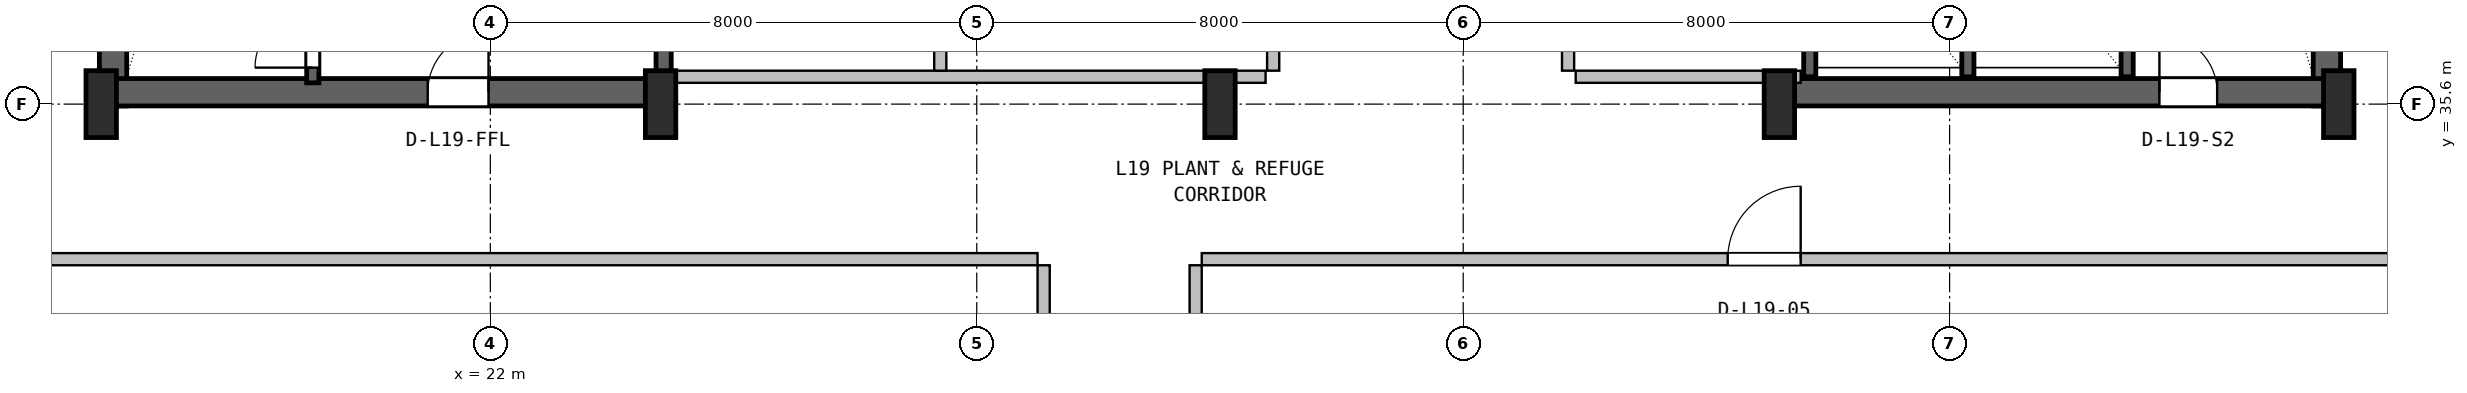
"""IFC4 building model, lengths in metres.
Left out: names, types, materials, properties, quantities, classifications, styles, units other than length and angle.
Written with IfcOpenShell. Run it as: python <this file> out.ifc"""

import sys

from ifc_helpers import new_model, si_unit, direction, frame, frame_2d, origin, origin_2d, place, context, subcontext, project, spatial, rectangle, i_section, extrude, source, transform, mapped, element, fill, save


model = new_model("IFC4")
c1 = context("Model", 3, precision=1e-05, world=origin(), true_north=direction((0.0, 1.0)))
c2 = subcontext(c1, "Body", "Model", "MODEL_VIEW")
j1 = project(units=[si_unit("LENGTHUNIT", "METRE"), si_unit("PLANEANGLEUNIT", "RADIAN")], contexts=[c1])
p1 = place(None, origin())
s1 = spatial("IfcSite", under=j1, at=p1, CompositionType="ELEMENT")
p2 = place(p1, origin())
s2 = spatial("IfcBuilding", under=s1, at=p2, CompositionType="ELEMENT")
p3 = place(p2, frame((0.0, 0.0, 82.2)))
s3 = spatial("IfcBuildingStorey", under=s2, at=p3, CompositionType="ELEMENT", Elevation=82.2)
for number, where, z_axis, x_axis in (
    (1, (15.795, 35.57, 0.0), (0.0, 0.0, 1.0), (0.0, 1.0, 0.0)),
    (2, (52.205, 35.57, 0.0), (0.0, 0.0, 1.0), (0.0, 1.0, 0.0)),
):
    element("IfcWall", number, at=place(p3, frame(where, z_axis=z_axis, x_axis=x_axis)), inside=s3, PredefinedType="SHEAR", context=c2, shape_type="SweptSolid", body=[
        extrude(rectangle(XDim=11.23, YDim=0.45, at=frame_2d((5.615, 0.0))), origin(), (0.0, 0.0, 1.0), 4.55),
    ])
p4 = place(p3, frame((15.57, 35.795, 0.0), z_axis=(0.0, 0.0, 1.0), x_axis=(1.0, 0.0, 0.0)))
e3 = element("IfcWall", 3, at=p4, inside=s3, PredefinedType="SHEAR", context=c2, shape_type="SweptSolid", body=[
    extrude(rectangle(XDim=9.23, YDim=0.45, at=frame_2d((4.615, 0.0))), origin(), (0.0, 0.0, 1.0), 4.55),
])
p5 = place(p4, frame((5.4, 0.0, 0.0)))
e4 = element("IfcOpeningElement", 4, at=p5, cuts=e3, PredefinedType="OPENING", context=c2, shape_type="SweptSolid", body=[
    extrude(rectangle(XDim=1.0, YDim=2.1, at=frame_2d((0.5, 1.05))), frame((0.0, 0.235, 0.0), z_axis=(0.0, -1.0, 0.0), x_axis=(1.0, 0.0, 0.0)), (0.0, 0.0, 1.0), 0.47),
])
p6 = place(p3, frame((43.2, 35.795, 0.0), z_axis=(0.0, 0.0, 1.0), x_axis=(1.0, 0.0, 0.0)))
e5 = element("IfcWall", 5, at=p6, inside=s3, PredefinedType="SHEAR", context=c2, shape_type="SweptSolid", body=[
    extrude(rectangle(XDim=9.23, YDim=0.45, at=frame_2d((4.615, 0.0))), origin(), (0.0, 0.0, 1.0), 4.55),
])
p7 = place(p6, frame((6.25, 0.0, 0.0)))
e6 = element("IfcOpeningElement", 6, at=p7, cuts=e5, PredefinedType="OPENING", context=c2, shape_type="SweptSolid", body=[
    extrude(rectangle(XDim=0.95, YDim=2.1, at=frame_2d((0.475, 1.05))), frame((0.0, 0.235, 0.0), z_axis=(0.0, -1.0, 0.0), x_axis=(1.0, 0.0, 0.0)), (0.0, 0.0, 1.0), 0.47),
])
m1 = source(origin(), c2, "Body", "SweptSolid", [
    extrude(i_section(OverallWidth=0.5, OverallDepth=1.1, WebThickness=0.018, FlangeThickness=0.032, FilletRadius=0.018, at=origin_2d()), origin(), (0.0, 0.0, 1.0), 4.8),
])
for number, where, z_axis, x_axis in (
    (7, (15.6, 35.6, 0.0), (0.0, 0.0, 1.0), (1.0, 0.0, 0.0)),
    (8, (24.8, 35.6, 0.0), (0.0, 0.0, 1.0), (1.0, 0.0, 0.0)),
    (9, (34.0, 35.6, 0.0), (0.0, 0.0, 1.0), (1.0, 0.0, 0.0)),
    (10, (43.2, 35.6, 0.0), (0.0, 0.0, 1.0), (1.0, 0.0, 0.0)),
    (11, (52.4, 35.6, 0.0), (0.0, 0.0, 1.0), (1.0, 0.0, 0.0)),
):
    element("IfcColumn", number, at=place(p3, frame(where, z_axis=z_axis, x_axis=x_axis)), inside=s3, PredefinedType="COLUMN", context=c2, shape_type="MappedRepresentation", body=[
        mapped(m1, transform((0.0, 0.0, 0.0), x_axis=(1.0, 0.0, 0.0), y_axis=(0.0, 1.0, 0.0), z_axis=(0.0, 0.0, 1.0), scale=1.0)),
    ])
p8 = place(p3, frame((19.08, 35.95, 0.0), z_axis=(0.0, 0.0, 1.0), x_axis=(0.0, 1.0, 0.0)))
e12 = element("IfcWall", 12, at=p8, inside=s3, PredefinedType="SHEAR", context=c2, shape_type="SweptSolid", body=[
    extrude(rectangle(XDim=9.65, YDim=0.2, at=frame_2d((4.825, 0.0))), origin(), (0.0, 0.0, 1.0), 4.55),
])
p9 = place(p8, frame((0.25, 0.0, 0.0)))
e13 = element("IfcOpeningElement", 13, at=p9, cuts=e12, PredefinedType="OPENING", context=c2, shape_type="SweptSolid", body=[
    extrude(rectangle(XDim=0.95, YDim=2.1, at=frame_2d((0.475, 1.05))), frame((0.0, 0.11, 0.0), z_axis=(0.0, -1.0, 0.0), x_axis=(1.0, 0.0, 0.0)), (0.0, 0.0, 1.0), 0.22),
])
p10 = place(p3, frame((24.85, 36.05, 0.0), z_axis=(0.0, 0.0, 1.0), x_axis=(0.0, 1.0, 0.0)))
e14 = element("IfcWall", 14, at=p10, inside=s3, PredefinedType="SHEAR", context=c2, shape_type="SweptSolid", body=[
    extrude(rectangle(XDim=10.45, YDim=0.25, at=frame_2d((5.225, 0.0))), origin(), (0.0, 0.0, 1.0), 4.55),
])
p11 = place(p3, frame((48.92, 36.05, 0.0), z_axis=(0.0, 0.0, 1.0), x_axis=(0.0, 1.0, 0.0)))
e15 = element("IfcWall", 15, at=p11, inside=s3, PredefinedType="SHEAR", context=c2, shape_type="SweptSolid", body=[
    extrude(rectangle(XDim=10.5, YDim=0.2, at=frame_2d((5.25, 0.0))), origin(), (0.0, 0.0, 1.0), 4.55),
])
for number, where, z_axis, x_axis in (
    (16, (43.7, 36.05, 0.0), (0.0, 0.0, 1.0), (0.0, 1.0, 0.0)),
    (17, (46.3, 36.05, 0.0), (0.0, 0.0, 1.0), (0.0, 1.0, 0.0)),
):
    element("IfcWall", number, at=place(p3, frame(where, z_axis=z_axis, x_axis=x_axis)), inside=s3, PredefinedType="SHEAR", context=c2, shape_type="SweptSolid", body=[
        extrude(rectangle(XDim=3.05, YDim=0.2, at=frame_2d((1.525, 0.0))), origin(), (0.0, 0.0, 1.0), 4.55),
    ])
p12 = place(p3, frame((25.0, 36.05, 0.0), z_axis=(0.0, 0.0, 1.0), x_axis=(1.0, 0.0, 0.0)))
e18 = element("IfcWall", 18, at=p12, inside=s3, PredefinedType="SOLIDWALL", context=c2, shape_type="SweptSolid", body=[
    extrude(rectangle(XDim=9.75, YDim=0.2, at=frame_2d((4.875, 0.0))), origin(), (0.0, 0.0, 1.0), 4.53),
])
for number, where, z_axis, x_axis in (
    (19, (29.4, 36.15, 0.0), (0.0, 0.0, 1.0), (0.0, 1.0, 0.0)),
    (20, (34.875, 36.15, 0.0), (0.0, 0.0, 1.0), (0.0, 1.0, 0.0)),
):
    element("IfcWall", number, at=place(p3, frame(where, z_axis=z_axis, x_axis=x_axis)), inside=s3, PredefinedType="SOLIDWALL", context=c2, shape_type="SweptSolid", body=[
        extrude(rectangle(XDim=3.0, YDim=0.2, at=frame_2d((1.5, 0.0))), origin(), (0.0, 0.0, 1.0), 4.53),
    ])
p13 = place(p3, frame((39.85, 36.05, 0.0), z_axis=(0.0, 0.0, 1.0), x_axis=(1.0, 0.0, 0.0)))
e21 = element("IfcWall", 21, at=p13, inside=s3, PredefinedType="SOLIDWALL", context=c2, shape_type="SweptSolid", body=[
    extrude(rectangle(XDim=3.7, YDim=0.2, at=frame_2d((1.85, 0.0))), origin(), (0.0, 0.0, 1.0), 4.53),
])
p14 = place(p3, frame((39.725, 36.15, 0.0), z_axis=(0.0, 0.0, 1.0), x_axis=(0.0, 1.0, 0.0)))
e22 = element("IfcWall", 22, at=p14, inside=s3, PredefinedType="SOLIDWALL", context=c2, shape_type="SweptSolid", body=[
    extrude(rectangle(XDim=3.0, YDim=0.2, at=frame_2d((1.5, 0.0))), origin(), (0.0, 0.0, 1.0), 4.53),
])
p15 = place(p3, frame((31.1, 19.775, 0.0), z_axis=(0.0, 0.0, 1.0), x_axis=(0.0, 1.0, 0.0)))
e23 = element("IfcWall", 23, at=p15, inside=s3, PredefinedType="SOLIDWALL", context=c2, shape_type="SweptSolid", body=[
    extrude(rectangle(XDim=13.175, YDim=0.2, at=frame_2d((6.587, 0.0))), origin(), (0.0, 0.0, 1.0), 3.195),
])
p16 = place(p3, frame((2.18, 33.05, 0.0), z_axis=(0.0, 0.0, 1.0), x_axis=(1.0, 0.0, 0.0)))
e24 = element("IfcWall", 24, at=p16, inside=s3, PredefinedType="SOLIDWALL", context=c2, shape_type="SweptSolid", body=[
    extrude(rectangle(XDim=28.82, YDim=0.2, at=frame_2d((14.41, 0.0))), origin(), (0.0, 0.0, 1.0), 2.925),
])
p17 = place(p3, frame((33.7, 33.05, 0.0), z_axis=(0.0, 0.0, 1.0), x_axis=(1.0, 0.0, 0.0)))
e25 = element("IfcWall", 25, at=p17, inside=s3, PredefinedType="SOLIDWALL", context=c2, shape_type="SweptSolid", body=[
    extrude(rectangle(XDim=32.12, YDim=0.2, at=frame_2d((16.06, 0.0))), origin(), (0.0, 0.0, 1.0), 2.925),
])
p18 = place(p17, frame((8.65, 0.0, 0.0)))
e26 = element("IfcOpeningElement", 26, at=p18, cuts=e25, PredefinedType="OPENING", context=c2, shape_type="SweptSolid", body=[
    extrude(rectangle(XDim=1.2, YDim=2.1, at=frame_2d((0.6, 1.05))), frame((0.0, 0.11, 0.0), z_axis=(0.0, -1.0, 0.0), x_axis=(1.0, 0.0, 0.0)), (0.0, 0.0, 1.0), 0.22),
])
p19 = place(p3, frame((33.6, 1.38, 0.0), z_axis=(0.0, 0.0, 1.0), x_axis=(0.0, 1.0, 0.0)))
e27 = element("IfcWall", 27, at=p19, inside=s3, PredefinedType="SOLIDWALL", context=c2, shape_type="SweptSolid", body=[
    extrude(rectangle(XDim=31.57, YDim=0.2, at=frame_2d((15.785, 0.0))), origin(), (0.0, 0.0, 1.0), 2.925),
])
p20 = place(p19, frame((7.895, 0.0, 0.0)))
e28 = element("IfcOpeningElement", 28, at=p20, cuts=e27, PredefinedType="OPENING", context=c2, shape_type="SweptSolid", body=[
    extrude(rectangle(XDim=1.2, YDim=2.1, at=frame_2d((0.6, 1.05))), frame((0.0, 0.11, 0.0), z_axis=(0.0, -1.0, 0.0), x_axis=(1.0, 0.0, 0.0)), (0.0, 0.0, 1.0), 0.22),
])
m2 = source(origin(), c2, "Body", "SweptSolid", [
    extrude(rectangle(XDim=0.95, YDim=2.1, at=frame_2d((0.475, 1.05))), frame((0.0, 0.025, 0.0), z_axis=(0.0, -1.0, 0.0), x_axis=(1.0, 0.0, 0.0)), (0.0, 0.0, 1.0), 0.05),
])
p21 = place(p9, origin())
e29 = element("IfcDoor", 29, at=p21, inside=s3, OperationType="SINGLE_SWING_LEFT", PredefinedType="DOOR", context=c2, shape_type="MappedRepresentation", body=[
    mapped(m2, transform((0.0, 0.0, 0.0), x_axis=(1.0, 0.0, 0.0), y_axis=(0.0, 1.0, 0.0), z_axis=(0.0, 0.0, 1.0), scale=1.0)),
])
fill(e13, e29)
m3 = source(origin(), c2, "Body", "SweptSolid", [
    extrude(rectangle(XDim=1.0, YDim=2.1, at=frame_2d((0.5, 1.05))), frame((0.0, 0.025, 0.0), z_axis=(0.0, -1.0, 0.0), x_axis=(1.0, 0.0, 0.0)), (0.0, 0.0, 1.0), 0.05),
])
p22 = place(p5, origin())
e30 = element("IfcDoor", 30, at=p22, inside=s3, OperationType="SINGLE_SWING_RIGHT", PredefinedType="DOOR", context=c2, shape_type="MappedRepresentation", body=[
    mapped(m3, transform((0.0, 0.0, 0.0), x_axis=(1.0, 0.0, 0.0), y_axis=(0.0, 1.0, 0.0), z_axis=(0.0, 0.0, 1.0), scale=1.0)),
])
fill(e4, e30)
p23 = place(p7, origin())
e31 = element("IfcDoor", 31, at=p23, inside=s3, OperationType="SINGLE_SWING_LEFT", PredefinedType="DOOR", context=c2, shape_type="MappedRepresentation", body=[
    mapped(m2, transform((0.0, 0.0, 0.0), x_axis=(1.0, 0.0, 0.0), y_axis=(0.0, 1.0, 0.0), z_axis=(0.0, 0.0, 1.0), scale=1.0)),
])
fill(e6, e31)
m4 = source(origin(), c2, "Body", "SweptSolid", [
    extrude(rectangle(XDim=1.2, YDim=2.1, at=frame_2d((0.6, 1.05))), frame((0.0, 0.025, 0.0), z_axis=(0.0, -1.0, 0.0), x_axis=(1.0, 0.0, 0.0)), (0.0, 0.0, 1.0), 0.05),
])
p24 = place(p18, origin())
e32 = element("IfcDoor", 32, at=p24, inside=s3, OperationType="SINGLE_SWING_RIGHT", PredefinedType="DOOR", context=c2, shape_type="MappedRepresentation", body=[
    mapped(m4, transform((0.0, 0.0, 0.0), x_axis=(1.0, 0.0, 0.0), y_axis=(0.0, 1.0, 0.0), z_axis=(0.0, 0.0, 1.0), scale=1.0)),
])
fill(e26, e32)
save(model, sys.argv[1])
